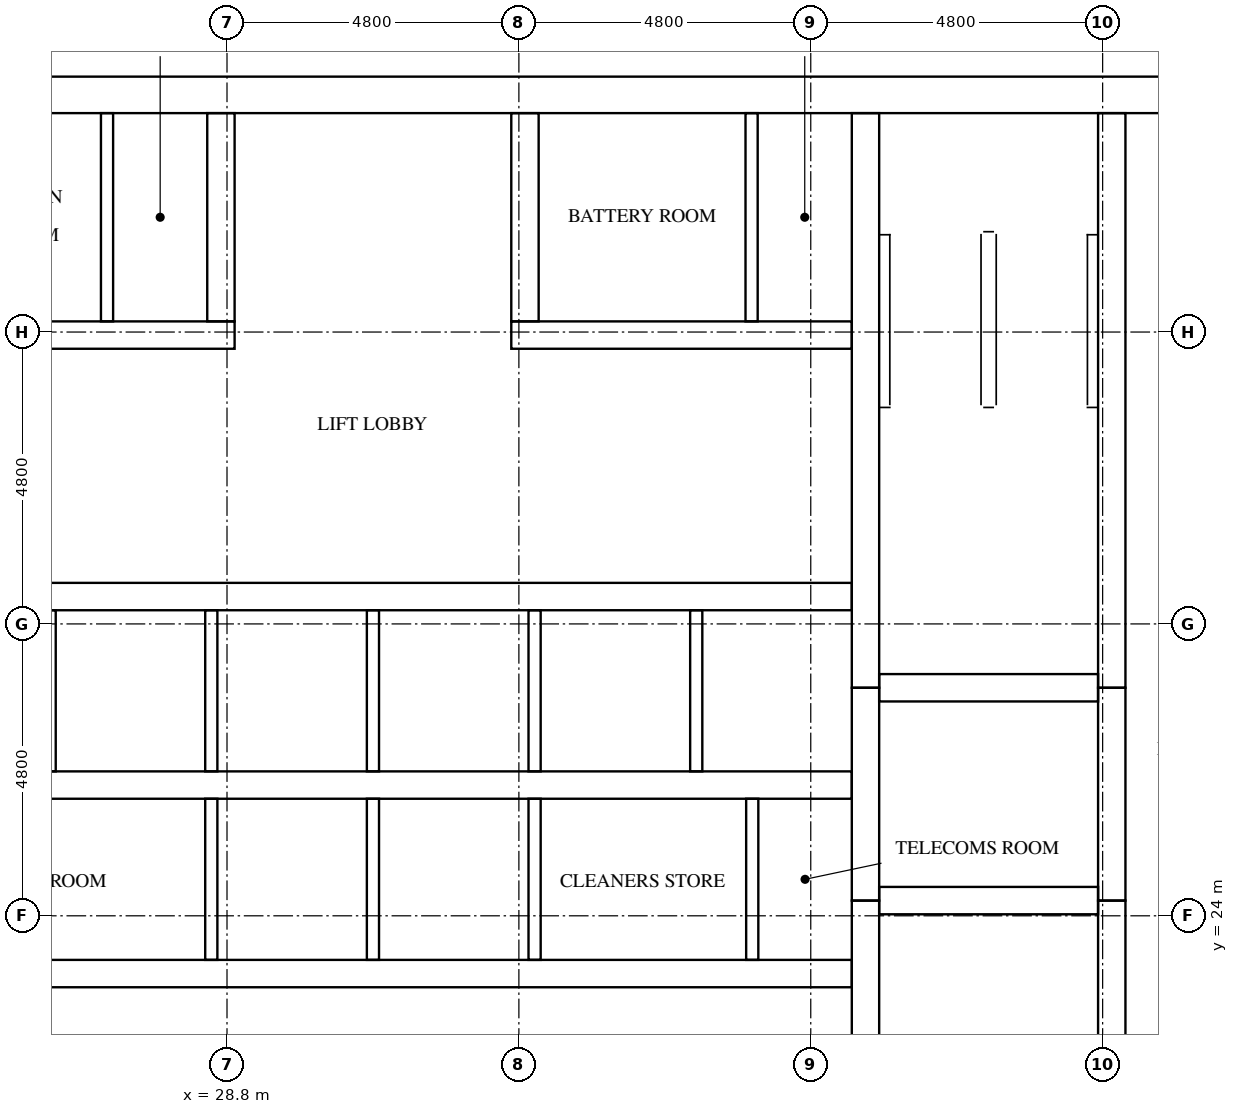
"""IFC4 building model, lengths in metres.
Left out: names, types, materials, properties, quantities, classifications, styles, units other than length and angle.
Written with IfcOpenShell. Run it as: python <this file> out.ifc"""

import sys

from ifc_helpers import new_model, si_unit, direction, frame, frame_2d, origin, place, context, subcontext, project, spatial, rectangle, extrude, element, fill, save


model = new_model("IFC4")
c1 = context("Model", 3, precision=1e-05, world=origin(), true_north=direction((0.0, 1.0)))
c2 = subcontext(c1, "Body", "Model", "MODEL_VIEW")
j1 = project(units=[si_unit("LENGTHUNIT", "METRE"), si_unit("PLANEANGLEUNIT", "RADIAN")], contexts=[c1])
p1 = place(None, origin())
s1 = spatial("IfcSite", under=j1, at=p1, CompositionType="ELEMENT")
p2 = place(p1, origin())
s2 = spatial("IfcBuilding", under=s1, at=p2, CompositionType="ELEMENT")
p3 = place(p2, frame((0.0, 0.0, 249.2)))
s3 = spatial("IfcBuildingStorey", under=s2, at=p3, CompositionType="ELEMENT", Elevation=249.2)
p4 = place(p3, frame((15.0, 37.5, 0.0), z_axis=(0.0, 0.0, 1.0), x_axis=(1.0, 0.0, 0.0)))
e1 = element("IfcWall", 1, at=p4, inside=s3, PredefinedType="SHEAR", context=c2, shape_type="SweptSolid", body=[
    extrude(rectangle(XDim=32.4, YDim=0.6, at=frame_2d((16.2, 0.0))), origin(), (0.0, 0.0, 1.0), 3.2),
])
p5 = place(p4, frame((15.3, 0.0, 0.0)))
e2 = element("IfcOpeningElement", 2, at=p5, cuts=e1, PredefinedType="OPENING", context=c2, shape_type="SweptSolid", body=[
    extrude(rectangle(XDim=1.8, YDim=2.1, at=frame_2d((0.9, 1.05))), frame((0.0, 0.31, 0.0), z_axis=(0.0, -1.0, 0.0), x_axis=(1.0, 0.0, 0.0)), (0.0, 0.0, 1.0), 0.62),
])
p6 = place(p4, frame((1.25, 0.0, 0.0)))
e3 = element("IfcOpeningElement", 3, at=p6, cuts=e1, PredefinedType="OPENING", context=c2, shape_type="SweptSolid", body=[
    extrude(rectangle(XDim=1.0, YDim=2.1, at=frame_2d((0.5, 1.05))), frame((0.0, 0.31, 0.0), z_axis=(0.0, -1.0, 0.0), x_axis=(1.0, 0.0, 0.0)), (0.0, 0.0, 1.0), 0.62),
])
p7 = place(p4, frame((4.988, 0.0, 0.0)))
e4 = element("IfcOpeningElement", 4, at=p7, cuts=e1, PredefinedType="OPENING", context=c2, shape_type="SweptSolid", body=[
    extrude(rectangle(XDim=1.0, YDim=2.1, at=frame_2d((0.5, 1.05))), frame((0.0, 0.31, 0.0), z_axis=(0.0, -1.0, 0.0), x_axis=(1.0, 0.0, 0.0)), (0.0, 0.0, 1.0), 0.62),
])
p8 = place(p3, frame((39.3, 15.6, 0.0), z_axis=(0.0, 0.0, 1.0), x_axis=(0.0, 1.0, 0.0)))
e5 = element("IfcWall", 5, at=p8, inside=s3, PredefinedType="SHEAR", context=c2, shape_type="SweptSolid", body=[
    extrude(rectangle(XDim=8.65, YDim=0.45, at=frame_2d((4.325, 0.0))), origin(), (0.0, 0.0, 1.0), 3.2),
])
p9 = place(p3, frame((39.3, 24.25, 0.0), z_axis=(0.0, 0.0, 1.0), x_axis=(0.0, 1.0, 0.0)))
e6 = element("IfcWall", 6, at=p9, inside=s3, PredefinedType="SHEAR", context=c2, shape_type="SweptSolid", body=[
    extrude(rectangle(XDim=3.5, YDim=0.45, at=frame_2d((1.75, 0.0))), origin(), (0.0, 0.0, 1.0), 3.2),
])
p10 = place(p3, frame((39.3, 27.75, 0.0), z_axis=(0.0, 0.0, 1.0), x_axis=(0.0, 1.0, 0.0)))
e7 = element("IfcWall", 7, at=p10, inside=s3, PredefinedType="SHEAR", context=c2, shape_type="SweptSolid", body=[
    extrude(rectangle(XDim=9.45, YDim=0.45, at=frame_2d((4.725, 0.0))), origin(), (0.0, 0.0, 1.0), 3.2),
])
p11 = place(p3, frame((43.35, 15.6, 0.0), z_axis=(0.0, 0.0, 1.0), x_axis=(0.0, 1.0, 0.0)))
e8 = element("IfcWall", 8, at=p11, inside=s3, PredefinedType="SHEAR", context=c2, shape_type="SweptSolid", body=[
    extrude(rectangle(XDim=8.65, YDim=0.45, at=frame_2d((4.325, 0.0))), origin(), (0.0, 0.0, 1.0), 3.2),
])
p12 = place(p11, frame((0.6, 0.0, 0.0)))
e9 = element("IfcOpeningElement", 9, at=p12, cuts=e8, PredefinedType="OPENING", context=c2, shape_type="SweptSolid", body=[
    extrude(rectangle(XDim=1.2, YDim=2.1, at=frame_2d((0.6, 1.05))), frame((0.0, 0.235, 0.0), z_axis=(0.0, -1.0, 0.0), x_axis=(1.0, 0.0, 0.0)), (0.0, 0.0, 1.0), 0.47),
])
p13 = place(p3, frame((43.35, 24.25, 0.0), z_axis=(0.0, 0.0, 1.0), x_axis=(0.0, 1.0, 0.0)))
e10 = element("IfcWall", 10, at=p13, inside=s3, PredefinedType="SHEAR", context=c2, shape_type="SweptSolid", body=[
    extrude(rectangle(XDim=3.5, YDim=0.45, at=frame_2d((1.75, 0.0))), origin(), (0.0, 0.0, 1.0), 3.2),
])
p14 = place(p13, frame((1.2, 0.0, 0.0)))
e11 = element("IfcOpeningElement", 11, at=p14, cuts=e10, PredefinedType="OPENING", context=c2, shape_type="SweptSolid", body=[
    extrude(rectangle(XDim=1.1, YDim=2.1, at=frame_2d((0.55, 1.05))), frame((0.0, 0.235, 0.0), z_axis=(0.0, -1.0, 0.0), x_axis=(1.0, 0.0, 0.0)), (0.0, 0.0, 1.0), 0.47),
])
p15 = place(p3, frame((43.35, 27.75, 0.0), z_axis=(0.0, 0.0, 1.0), x_axis=(0.0, 1.0, 0.0)))
e12 = element("IfcWall", 12, at=p15, inside=s3, PredefinedType="SHEAR", context=c2, shape_type="SweptSolid", body=[
    extrude(rectangle(XDim=9.45, YDim=0.45, at=frame_2d((4.725, 0.0))), origin(), (0.0, 0.0, 1.0), 3.2),
])
p16 = place(p15, frame((7.65, 0.0, 0.0)))
e13 = element("IfcOpeningElement", 13, at=p16, cuts=e12, PredefinedType="OPENING", context=c2, shape_type="SweptSolid", body=[
    extrude(rectangle(XDim=1.2, YDim=2.1, at=frame_2d((0.6, 1.05))), frame((0.0, 0.235, 0.0), z_axis=(0.0, -1.0, 0.0), x_axis=(1.0, 0.0, 0.0)), (0.0, 0.0, 1.0), 0.47),
])
for number, where, z_axis, x_axis in (
    (14, (39.525, 24.25, 0.0), (0.0, 0.0, 1.0), (1.0, 0.0, 0.0)),
    (15, (39.525, 27.75, 0.0), (0.0, 0.0, 1.0), (1.0, 0.0, 0.0)),
):
    element("IfcWall", number, at=place(p3, frame(where, z_axis=z_axis, x_axis=x_axis)), inside=s3, PredefinedType="SHEAR", context=c2, shape_type="SweptSolid", body=[
        extrude(rectangle(XDim=3.6, YDim=0.45, at=frame_2d((1.8, 0.0))), origin(), (0.0, 0.0, 1.0), 3.2),
    ])
p17 = place(p3, frame((23.325, 23.05, 0.0), z_axis=(0.0, 0.0, 1.0), x_axis=(1.0, 0.0, 0.0)))
e16 = element("IfcWall", 16, at=p17, inside=s3, PredefinedType="SHEAR", context=c2, shape_type="SweptSolid", body=[
    extrude(rectangle(XDim=15.75, YDim=0.45, at=frame_2d((7.875, 0.0))), origin(), (0.0, 0.0, 1.0), 3.2),
])
p18 = place(p17, frame((2.058, 0.0, 0.0)))
e17 = element("IfcOpeningElement", 17, at=p18, cuts=e16, PredefinedType="OPENING", context=c2, shape_type="SweptSolid", body=[
    extrude(rectangle(XDim=1.0, YDim=2.1, at=frame_2d((0.5, 1.05))), frame((0.0, 0.235, 0.0), z_axis=(0.0, -1.0, 0.0), x_axis=(1.0, 0.0, 0.0)), (0.0, 0.0, 1.0), 0.47),
])
p19 = place(p17, frame((11.823, 0.0, 0.0)))
e18 = element("IfcOpeningElement", 18, at=p19, cuts=e16, PredefinedType="OPENING", context=c2, shape_type="SweptSolid", body=[
    extrude(rectangle(XDim=1.0, YDim=2.1, at=frame_2d((0.5, 1.05))), frame((0.0, 0.235, 0.0), z_axis=(0.0, -1.0, 0.0), x_axis=(1.0, 0.0, 0.0)), (0.0, 0.0, 1.0), 0.47),
])
p20 = place(p17, frame((14.481, 0.0, 0.0)))
e19 = element("IfcOpeningElement", 19, at=p20, cuts=e16, PredefinedType="OPENING", context=c2, shape_type="SweptSolid", body=[
    extrude(rectangle(XDim=1.0, YDim=2.1, at=frame_2d((0.5, 1.05))), frame((0.0, 0.235, 0.0), z_axis=(0.0, -1.0, 0.0), x_axis=(1.0, 0.0, 0.0)), (0.0, 0.0, 1.0), 0.47),
])
p21 = place(p3, frame((23.325, 26.15, 0.0), z_axis=(0.0, 0.0, 1.0), x_axis=(1.0, 0.0, 0.0)))
e20 = element("IfcWall", 20, at=p21, inside=s3, PredefinedType="SHEAR", context=c2, shape_type="SweptSolid", body=[
    extrude(rectangle(XDim=15.75, YDim=0.45, at=frame_2d((7.875, 0.0))), origin(), (0.0, 0.0, 1.0), 3.2),
])
p22 = place(p3, frame((23.325, 29.25, 0.0), z_axis=(0.0, 0.0, 1.0), x_axis=(1.0, 0.0, 0.0)))
e21 = element("IfcWall", 21, at=p22, inside=s3, PredefinedType="SHEAR", context=c2, shape_type="SweptSolid", body=[
    extrude(rectangle(XDim=15.75, YDim=0.45, at=frame_2d((7.875, 0.0))), origin(), (0.0, 0.0, 1.0), 3.2),
])
p23 = place(p22, frame((0.679, 0.0, 0.0)))
e22 = element("IfcOpeningElement", 22, at=p23, cuts=e21, PredefinedType="OPENING", context=c2, shape_type="SweptSolid", body=[
    extrude(rectangle(XDim=1.1, YDim=2.1, at=frame_2d((0.55, 1.05))), frame((0.0, 0.235, 0.0), z_axis=(0.0, -1.0, 0.0), x_axis=(1.0, 0.0, 0.0)), (0.0, 0.0, 1.0), 0.47),
])
p24 = place(p22, frame((3.337, 0.0, 0.0)))
e23 = element("IfcOpeningElement", 23, at=p24, cuts=e21, PredefinedType="OPENING", context=c2, shape_type="SweptSolid", body=[
    extrude(rectangle(XDim=1.1, YDim=2.1, at=frame_2d((0.55, 1.05))), frame((0.0, 0.235, 0.0), z_axis=(0.0, -1.0, 0.0), x_axis=(1.0, 0.0, 0.0)), (0.0, 0.0, 1.0), 0.47),
])
p25 = place(p22, frame((5.996, 0.0, 0.0)))
e24 = element("IfcOpeningElement", 24, at=p25, cuts=e21, PredefinedType="OPENING", context=c2, shape_type="SweptSolid", body=[
    extrude(rectangle(XDim=1.1, YDim=2.1, at=frame_2d((0.55, 1.05))), frame((0.0, 0.235, 0.0), z_axis=(0.0, -1.0, 0.0), x_axis=(1.0, 0.0, 0.0)), (0.0, 0.0, 1.0), 0.47),
])
p26 = place(p22, frame((8.654, 0.0, 0.0)))
e25 = element("IfcOpeningElement", 25, at=p26, cuts=e21, PredefinedType="OPENING", context=c2, shape_type="SweptSolid", body=[
    extrude(rectangle(XDim=1.1, YDim=2.1, at=frame_2d((0.55, 1.05))), frame((0.0, 0.235, 0.0), z_axis=(0.0, -1.0, 0.0), x_axis=(1.0, 0.0, 0.0)), (0.0, 0.0, 1.0), 0.47),
])
p27 = place(p22, frame((11.312, 0.0, 0.0)))
e26 = element("IfcOpeningElement", 26, at=p27, cuts=e21, PredefinedType="OPENING", context=c2, shape_type="SweptSolid", body=[
    extrude(rectangle(XDim=1.1, YDim=2.1, at=frame_2d((0.55, 1.05))), frame((0.0, 0.235, 0.0), z_axis=(0.0, -1.0, 0.0), x_axis=(1.0, 0.0, 0.0)), (0.0, 0.0, 1.0), 0.47),
])
p28 = place(p22, frame((13.971, 0.0, 0.0)))
e27 = element("IfcOpeningElement", 27, at=p28, cuts=e21, PredefinedType="OPENING", context=c2, shape_type="SweptSolid", body=[
    extrude(rectangle(XDim=1.1, YDim=2.1, at=frame_2d((0.55, 1.05))), frame((0.0, 0.235, 0.0), z_axis=(0.0, -1.0, 0.0), x_axis=(1.0, 0.0, 0.0)), (0.0, 0.0, 1.0), 0.47),
])
p29 = place(p3, frame((23.325, 33.55, 0.0), z_axis=(0.0, 0.0, 1.0), x_axis=(1.0, 0.0, 0.0)))
e28 = element("IfcWall", 28, at=p29, inside=s3, PredefinedType="SHEAR", context=c2, shape_type="SweptSolid", body=[
    extrude(rectangle(XDim=5.6, YDim=0.45, at=frame_2d((2.8, 0.0))), origin(), (0.0, 0.0, 1.0), 3.2),
])
p30 = place(p29, frame((1.201, 0.0, 0.0)))
e29 = element("IfcOpeningElement", 29, at=p30, cuts=e28, PredefinedType="OPENING", context=c2, shape_type="SweptSolid", body=[
    extrude(rectangle(XDim=1.0, YDim=2.1, at=frame_2d((0.5, 1.05))), frame((0.0, 0.235, 0.0), z_axis=(0.0, -1.0, 0.0), x_axis=(1.0, 0.0, 0.0)), (0.0, 0.0, 1.0), 0.47),
])
p31 = place(p29, frame((3.876, 0.0, 0.0)))
e30 = element("IfcOpeningElement", 30, at=p31, cuts=e28, PredefinedType="OPENING", context=c2, shape_type="SweptSolid", body=[
    extrude(rectangle(XDim=1.0, YDim=2.1, at=frame_2d((0.5, 1.05))), frame((0.0, 0.235, 0.0), z_axis=(0.0, -1.0, 0.0), x_axis=(1.0, 0.0, 0.0)), (0.0, 0.0, 1.0), 0.47),
])
p32 = place(p3, frame((33.475, 33.55, 0.0), z_axis=(0.0, 0.0, 1.0), x_axis=(1.0, 0.0, 0.0)))
e31 = element("IfcWall", 31, at=p32, inside=s3, PredefinedType="SHEAR", context=c2, shape_type="SweptSolid", body=[
    extrude(rectangle(XDim=5.6, YDim=0.45, at=frame_2d((2.8, 0.0))), origin(), (0.0, 0.0, 1.0), 3.2),
])
p33 = place(p32, frame((1.651, 0.0, 0.0)))
e32 = element("IfcOpeningElement", 32, at=p33, cuts=e31, PredefinedType="OPENING", context=c2, shape_type="SweptSolid", body=[
    extrude(rectangle(XDim=1.0, YDim=2.1, at=frame_2d((0.5, 1.05))), frame((0.0, 0.235, 0.0), z_axis=(0.0, -1.0, 0.0), x_axis=(1.0, 0.0, 0.0)), (0.0, 0.0, 1.0), 0.47),
])
p34 = place(p32, frame((4.326, 0.0, 0.0)))
e33 = element("IfcOpeningElement", 33, at=p34, cuts=e31, PredefinedType="OPENING", context=c2, shape_type="SweptSolid", body=[
    extrude(rectangle(XDim=1.0, YDim=2.1, at=frame_2d((0.5, 1.05))), frame((0.0, 0.235, 0.0), z_axis=(0.0, -1.0, 0.0), x_axis=(1.0, 0.0, 0.0)), (0.0, 0.0, 1.0), 0.47),
])
for number, where, z_axis, x_axis in (
    (34, (28.7, 33.775, 0.0), (0.0, 0.0, 1.0), (0.0, 1.0, 0.0)),
    (35, (33.7, 33.775, 0.0), (0.0, 0.0, 1.0), (0.0, 1.0, 0.0)),
):
    element("IfcWall", number, at=place(p3, frame(where, z_axis=z_axis, x_axis=x_axis)), inside=s3, PredefinedType="SHEAR", context=c2, shape_type="SweptSolid", body=[
        extrude(rectangle(XDim=3.425, YDim=0.45, at=frame_2d((1.712, 0.0))), origin(), (0.0, 0.0, 1.0), 3.2),
    ])
p35 = place(p3, frame((25.883, 26.375, 0.0), z_axis=(0.0, 0.0, 1.0), x_axis=(0.0, 1.0, 0.0)))
e36 = element("IfcWall", 36, at=p35, inside=s3, PredefinedType="SOLIDWALL", context=c2, shape_type="SweptSolid", body=[
    extrude(rectangle(XDim=2.65, YDim=0.2, at=frame_2d((1.325, 0.0))), origin(), (0.0, 0.0, 1.0), 3.2),
])
p36 = place(p3, frame((28.542, 23.275, 0.0), z_axis=(0.0, 0.0, 1.0), x_axis=(0.0, 1.0, 0.0)))
e37 = element("IfcWall", 37, at=p36, inside=s3, PredefinedType="SOLIDWALL", context=c2, shape_type="SweptSolid", body=[
    extrude(rectangle(XDim=2.65, YDim=0.2, at=frame_2d((1.325, 0.0))), origin(), (0.0, 0.0, 1.0), 3.2),
])
p37 = place(p3, frame((28.542, 26.375, 0.0), z_axis=(0.0, 0.0, 1.0), x_axis=(0.0, 1.0, 0.0)))
e38 = element("IfcWall", 38, at=p37, inside=s3, PredefinedType="SOLIDWALL", context=c2, shape_type="SweptSolid", body=[
    extrude(rectangle(XDim=2.65, YDim=0.2, at=frame_2d((1.325, 0.0))), origin(), (0.0, 0.0, 1.0), 3.2),
])
p38 = place(p3, frame((31.2, 23.275, 0.0), z_axis=(0.0, 0.0, 1.0), x_axis=(0.0, 1.0, 0.0)))
e39 = element("IfcWall", 39, at=p38, inside=s3, PredefinedType="SOLIDWALL", context=c2, shape_type="SweptSolid", body=[
    extrude(rectangle(XDim=2.65, YDim=0.2, at=frame_2d((1.325, 0.0))), origin(), (0.0, 0.0, 1.0), 3.2),
])
p39 = place(p3, frame((31.2, 26.375, 0.0), z_axis=(0.0, 0.0, 1.0), x_axis=(0.0, 1.0, 0.0)))
e40 = element("IfcWall", 40, at=p39, inside=s3, PredefinedType="SOLIDWALL", context=c2, shape_type="SweptSolid", body=[
    extrude(rectangle(XDim=2.65, YDim=0.2, at=frame_2d((1.325, 0.0))), origin(), (0.0, 0.0, 1.0), 3.2),
])
p40 = place(p3, frame((33.858, 23.275, 0.0), z_axis=(0.0, 0.0, 1.0), x_axis=(0.0, 1.0, 0.0)))
e41 = element("IfcWall", 41, at=p40, inside=s3, PredefinedType="SOLIDWALL", context=c2, shape_type="SweptSolid", body=[
    extrude(rectangle(XDim=2.65, YDim=0.2, at=frame_2d((1.325, 0.0))), origin(), (0.0, 0.0, 1.0), 3.2),
])
for number, where, z_axis, x_axis in (
    (42, (33.858, 26.375, 0.0), (0.0, 0.0, 1.0), (0.0, 1.0, 0.0)),
    (43, (36.517, 26.375, 0.0), (0.0, 0.0, 1.0), (0.0, 1.0, 0.0)),
):
    element("IfcWall", number, at=place(p3, frame(where, z_axis=z_axis, x_axis=x_axis)), inside=s3, PredefinedType="SOLIDWALL", context=c2, shape_type="SweptSolid", body=[
        extrude(rectangle(XDim=2.65, YDim=0.2, at=frame_2d((1.325, 0.0))), origin(), (0.0, 0.0, 1.0), 3.2),
    ])
p41 = place(p3, frame((37.438, 23.275, 0.0), z_axis=(0.0, 0.0, 1.0), x_axis=(0.0, 1.0, 0.0)))
e44 = element("IfcWall", 44, at=p41, inside=s3, PredefinedType="PARTITIONING", context=c2, shape_type="SweptSolid", body=[
    extrude(rectangle(XDim=2.65, YDim=0.2, at=frame_2d((1.325, 0.0))), origin(), (0.0, 0.0, 1.0), 3.2),
])
for number, where, z_axis, x_axis in (
    (45, (26.827, 33.775, 0.0), (0.0, 0.0, 1.0), (0.0, 1.0, 0.0)),
    (46, (37.427, 33.775, 0.0), (0.0, 0.0, 1.0), (0.0, 1.0, 0.0)),
):
    element("IfcWall", number, at=place(p3, frame(where, z_axis=z_axis, x_axis=x_axis)), inside=s3, PredefinedType="PARTITIONING", context=c2, shape_type="SweptSolid", body=[
        extrude(rectangle(XDim=3.425, YDim=0.2, at=frame_2d((1.712, 0.0))), origin(), (0.0, 0.0, 1.0), 3.2),
    ])
p42 = place(p24, origin())
e47 = element("IfcDoor", 47, at=p42, inside=s3, OperationType="DOUBLE_DOOR_SLIDING", PredefinedType="DOOR", context=c2, shape_type="SweptSolid", body=[
    extrude(rectangle(XDim=1.1, YDim=2.1, at=frame_2d((0.55, 1.05))), frame((0.0, 0.025, 0.0), z_axis=(0.0, -1.0, 0.0), x_axis=(1.0, 0.0, 0.0)), (0.0, 0.0, 1.0), 0.05),
])
fill(e23, e47)
p43 = place(p25, origin())
e48 = element("IfcDoor", 48, at=p43, inside=s3, OperationType="DOUBLE_DOOR_SLIDING", PredefinedType="DOOR", context=c2, shape_type="SweptSolid", body=[
    extrude(rectangle(XDim=1.1, YDim=2.1, at=frame_2d((0.55, 1.05))), frame((0.0, 0.025, 0.0), z_axis=(0.0, -1.0, 0.0), x_axis=(1.0, 0.0, 0.0)), (0.0, 0.0, 1.0), 0.05),
])
fill(e24, e48)
p44 = place(p26, origin())
e49 = element("IfcDoor", 49, at=p44, inside=s3, OperationType="DOUBLE_DOOR_SLIDING", PredefinedType="DOOR", context=c2, shape_type="SweptSolid", body=[
    extrude(rectangle(XDim=1.1, YDim=2.1, at=frame_2d((0.55, 1.05))), frame((0.0, 0.025, 0.0), z_axis=(0.0, -1.0, 0.0), x_axis=(1.0, 0.0, 0.0)), (0.0, 0.0, 1.0), 0.05),
])
fill(e25, e49)
p45 = place(p27, origin())
e50 = element("IfcDoor", 50, at=p45, inside=s3, OperationType="DOUBLE_DOOR_SLIDING", PredefinedType="DOOR", context=c2, shape_type="SweptSolid", body=[
    extrude(rectangle(XDim=1.1, YDim=2.1, at=frame_2d((0.55, 1.05))), frame((0.0, 0.025, 0.0), z_axis=(0.0, -1.0, 0.0), x_axis=(1.0, 0.0, 0.0)), (0.0, 0.0, 1.0), 0.05),
])
fill(e26, e50)
p46 = place(p28, origin())
e51 = element("IfcDoor", 51, at=p46, inside=s3, OperationType="DOUBLE_DOOR_SLIDING", PredefinedType="DOOR", context=c2, shape_type="SweptSolid", body=[
    extrude(rectangle(XDim=1.1, YDim=2.1, at=frame_2d((0.55, 1.05))), frame((0.0, 0.025, 0.0), z_axis=(0.0, -1.0, 0.0), x_axis=(1.0, 0.0, 0.0)), (0.0, 0.0, 1.0), 0.05),
])
fill(e27, e51)
p47 = place(p14, origin())
e52 = element("IfcDoor", 52, at=p47, inside=s3, OperationType="DOUBLE_DOOR_SLIDING", PredefinedType="DOOR", context=c2, shape_type="SweptSolid", body=[
    extrude(rectangle(XDim=1.1, YDim=2.1, at=frame_2d((0.55, 1.05))), frame((0.0, 0.025, 0.0), z_axis=(0.0, -1.0, 0.0), x_axis=(1.0, 0.0, 0.0)), (0.0, 0.0, 1.0), 0.05),
])
fill(e11, e52)
p48 = place(p16, origin())
e53 = element("IfcDoor", 53, at=p48, inside=s3, OperationType="SINGLE_SWING_LEFT", PredefinedType="DOOR", context=c2, shape_type="SweptSolid", body=[
    extrude(rectangle(XDim=1.2, YDim=2.1, at=frame_2d((0.6, 1.05))), frame((0.0, 0.025, 0.0), z_axis=(0.0, -1.0, 0.0), x_axis=(1.0, 0.0, 0.0)), (0.0, 0.0, 1.0), 0.05),
])
fill(e13, e53)
p49 = place(p5, origin())
e54 = element("IfcDoor", 54, at=p49, inside=s3, OperationType="DOUBLE_DOOR_SINGLE_SWING", PredefinedType="DOOR", context=c2, shape_type="SweptSolid", body=[
    extrude(rectangle(XDim=1.8, YDim=2.1, at=frame_2d((0.9, 1.05))), frame((0.0, 0.025, 0.0), z_axis=(0.0, -1.0, 0.0), x_axis=(1.0, 0.0, 0.0)), (0.0, 0.0, 1.0), 0.05),
])
fill(e2, e54)
p50 = place(p18, frame((1.0, 0.0, 0.0), z_axis=(0.0, 0.0, 1.0), x_axis=(-1.0, 0.0, 0.0)))
e55 = element("IfcDoor", 55, at=p50, inside=s3, OperationType="SINGLE_SWING_RIGHT", PredefinedType="DOOR", context=c2, shape_type="SweptSolid", body=[
    extrude(rectangle(XDim=1.0, YDim=2.1, at=frame_2d((0.5, 1.05))), frame((0.0, 0.025, 0.0), z_axis=(0.0, -1.0, 0.0), x_axis=(1.0, 0.0, 0.0)), (0.0, 0.0, 1.0), 0.05),
])
fill(e17, e55)
p51 = place(p19, frame((1.0, 0.0, 0.0), z_axis=(0.0, 0.0, 1.0), x_axis=(-1.0, 0.0, 0.0)))
e56 = element("IfcDoor", 56, at=p51, inside=s3, OperationType="SINGLE_SWING_LEFT", PredefinedType="DOOR", context=c2, shape_type="SweptSolid", body=[
    extrude(rectangle(XDim=1.0, YDim=2.1, at=frame_2d((0.5, 1.05))), frame((0.0, 0.025, 0.0), z_axis=(0.0, -1.0, 0.0), x_axis=(1.0, 0.0, 0.0)), (0.0, 0.0, 1.0), 0.05),
])
fill(e18, e56)
p52 = place(p20, frame((1.0, 0.0, 0.0), z_axis=(0.0, 0.0, 1.0), x_axis=(-1.0, 0.0, 0.0)))
e57 = element("IfcDoor", 57, at=p52, inside=s3, OperationType="SINGLE_SWING_RIGHT", PredefinedType="DOOR", context=c2, shape_type="SweptSolid", body=[
    extrude(rectangle(XDim=1.0, YDim=2.1, at=frame_2d((0.5, 1.05))), frame((0.0, 0.025, 0.0), z_axis=(0.0, -1.0, 0.0), x_axis=(1.0, 0.0, 0.0)), (0.0, 0.0, 1.0), 0.05),
])
fill(e19, e57)
p53 = place(p31, frame((1.0, 0.0, 0.0), z_axis=(0.0, 0.0, 1.0), x_axis=(-1.0, 0.0, 0.0)))
e58 = element("IfcDoor", 58, at=p53, inside=s3, OperationType="SINGLE_SWING_RIGHT", PredefinedType="DOOR", context=c2, shape_type="SweptSolid", body=[
    extrude(rectangle(XDim=1.0, YDim=2.1, at=frame_2d((0.5, 1.05))), frame((0.0, 0.025, 0.0), z_axis=(0.0, -1.0, 0.0), x_axis=(1.0, 0.0, 0.0)), (0.0, 0.0, 1.0), 0.05),
])
fill(e30, e58)
p54 = place(p33, frame((1.0, 0.0, 0.0), z_axis=(0.0, 0.0, 1.0), x_axis=(-1.0, 0.0, 0.0)))
e59 = element("IfcDoor", 59, at=p54, inside=s3, OperationType="SINGLE_SWING_LEFT", PredefinedType="DOOR", context=c2, shape_type="SweptSolid", body=[
    extrude(rectangle(XDim=1.0, YDim=2.1, at=frame_2d((0.5, 1.05))), frame((0.0, 0.025, 0.0), z_axis=(0.0, -1.0, 0.0), x_axis=(1.0, 0.0, 0.0)), (0.0, 0.0, 1.0), 0.05),
])
fill(e32, e59)
p55 = place(p34, frame((1.0, 0.0, 0.0), z_axis=(0.0, 0.0, 1.0), x_axis=(-1.0, 0.0, 0.0)))
e60 = element("IfcDoor", 60, at=p55, inside=s3, OperationType="SINGLE_SWING_RIGHT", PredefinedType="DOOR", context=c2, shape_type="SweptSolid", body=[
    extrude(rectangle(XDim=1.0, YDim=2.1, at=frame_2d((0.5, 1.05))), frame((0.0, 0.025, 0.0), z_axis=(0.0, -1.0, 0.0), x_axis=(1.0, 0.0, 0.0)), (0.0, 0.0, 1.0), 0.05),
])
fill(e33, e60)
save(model, sys.argv[1])
